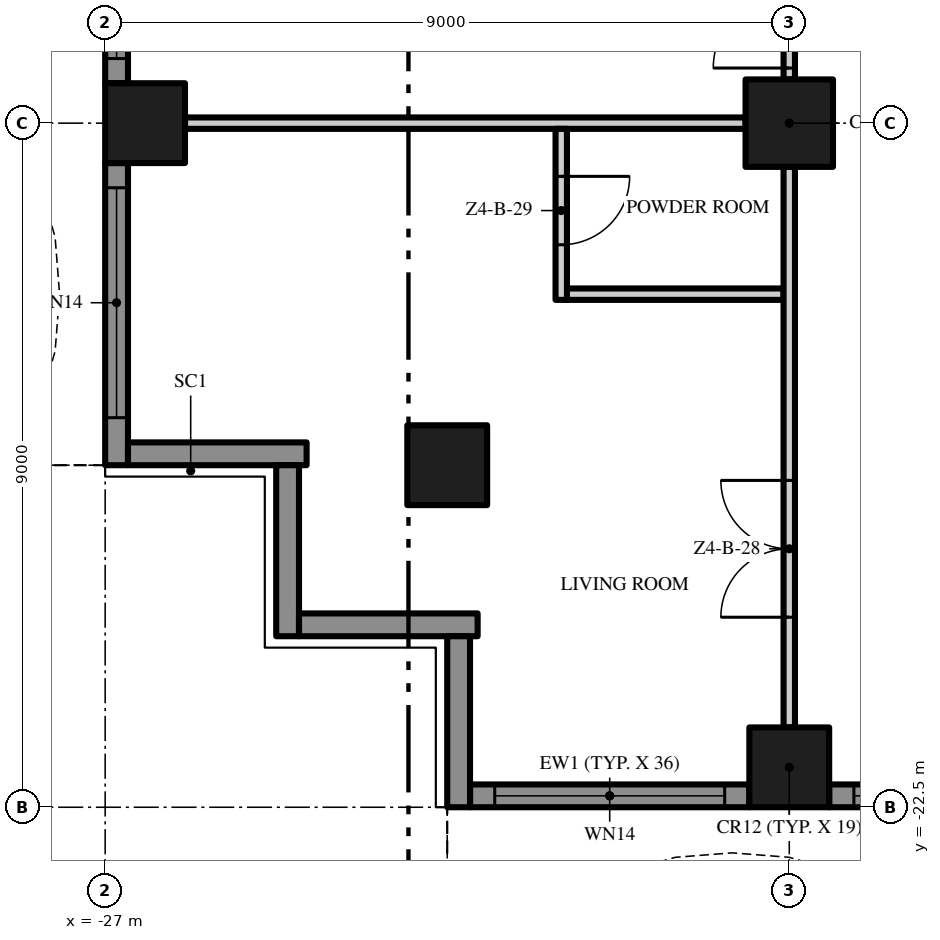
"""IFC4 building model, lengths in metres.
Left out: names, types, materials, properties, quantities, classifications, styles, units other than length and angle.
Written with IfcOpenShell. Run it as: python <this file> out.ifc"""

import sys

from ifc_helpers import new_model, si_unit, direction, frame, frame_2d, origin, origin_2d, place, context, subcontext, project, spatial, polyline, rectangle, outline, extrude, element, fill, save


model = new_model("IFC4")
c1 = context("Model", 3, precision=1e-05, world=origin(), true_north=direction((0.0, 1.0)))
c2 = subcontext(c1, "Body", "Model", "MODEL_VIEW")
j1 = project(units=[si_unit("LENGTHUNIT", "METRE"), si_unit("PLANEANGLEUNIT", "RADIAN")], contexts=[c1])
p1 = place(None, origin())
s1 = spatial("IfcSite", under=j1, at=p1, CompositionType="ELEMENT")
p2 = place(p1, origin())
s2 = spatial("IfcBuilding", under=s1, at=p2, CompositionType="ELEMENT")
p3 = place(p2, frame((0.0, 0.0, 195.8)))
s3 = spatial("IfcBuildingStorey", under=s2, at=p3, CompositionType="ELEMENT", Elevation=195.8)
p4 = place(p3, frame((-18.0, -13.5, 0.0), z_axis=(0.0, 0.0, 1.0), x_axis=(1.0, 0.0, 0.0)))
e1 = element("IfcColumn", 1, at=p4, inside=s3, PredefinedType="COLUMN", context=c2, shape_type="SweptSolid", body=[
    extrude(rectangle(XDim=1.15, YDim=1.15, at=origin_2d()), origin(), (0.0, 0.0, 1.0), 3.5),
])
for number, where, z_axis, x_axis in (
    (2, (-18.0, -21.975, 0.0), (0.0, 0.0, 1.0), (1.0, 0.0, 0.0)),
    (3, (-26.475, -13.5, 0.0), (0.0, 0.0, 1.0), (1.0, 0.0, 0.0)),
    (4, (-22.5, -18.0, 0.0), (0.0, 0.0, 1.0), (1.0, 0.0, 0.0)),
):
    element("IfcColumn", number, at=place(p3, frame(where, z_axis=z_axis, x_axis=x_axis)), inside=s3, PredefinedType="COLUMN", context=c2, shape_type="SweptSolid", body=[
        extrude(rectangle(XDim=1.05, YDim=1.05, at=origin_2d()), origin(), (0.0, 0.0, 1.0), 3.5),
    ])
p5 = place(p3, frame((-18.525, -22.35, 0.0), z_axis=(0.0, 0.0, 1.0), x_axis=(-1.0, 0.0, 0.0)))
e5 = element("IfcWall", 5, at=p5, inside=s3, PredefinedType="SOLIDWALL", context=c2, shape_type="SweptSolid", body=[
    extrude(rectangle(XDim=3.675, YDim=0.3, at=frame_2d((1.837, 0.0))), origin(), (0.0, 0.0, 1.0), 3.5),
])
p6 = place(p5, frame((0.325, 0.0, 0.45)))
e6 = element("IfcOpeningElement", 6, at=p6, cuts=e5, PredefinedType="OPENING", context=c2, shape_type="SweptSolid", body=[
    extrude(rectangle(XDim=3.025, YDim=2.65, at=frame_2d((1.512, 1.325))), frame((0.0, 0.16, 0.0), z_axis=(0.0, -1.0, 0.0), x_axis=(1.0, 0.0, 0.0)), (0.0, 0.0, 1.0), 0.32),
])
p7 = place(p3, frame((-9.525, -22.35, 0.0), z_axis=(0.0, 0.0, 1.0), x_axis=(-1.0, 0.0, 0.0)))
e7 = element("IfcWall", 7, at=p7, inside=s3, PredefinedType="SOLIDWALL", context=c2, shape_type="SweptSolid", body=[
    extrude(rectangle(XDim=7.95, YDim=0.3, at=frame_2d((3.975, 0.0))), origin(), (0.0, 0.0, 1.0), 3.5),
])
p8 = place(p7, frame((4.6, 0.0, 0.45)))
e8 = element("IfcOpeningElement", 8, at=p8, cuts=e7, PredefinedType="OPENING", context=c2, shape_type="SweptSolid", body=[
    extrude(rectangle(XDim=3.025, YDim=2.65, at=frame_2d((1.512, 1.325))), frame((0.0, 0.16, 0.0), z_axis=(0.0, -1.0, 0.0), x_axis=(1.0, 0.0, 0.0)), (0.0, 0.0, 1.0), 0.32),
])
p9 = place(p7, frame((0.325, 0.0, 0.0)))
e9 = element("IfcOpeningElement", 9, at=p9, cuts=e7, PredefinedType="OPENING", context=c2, shape_type="SweptSolid", body=[
    extrude(rectangle(XDim=3.025, YDim=2.4, at=frame_2d((1.512, 1.2))), frame((0.0, 0.16, 0.0), z_axis=(0.0, -1.0, 0.0), x_axis=(1.0, 0.0, 0.0)), (0.0, 0.0, 1.0), 0.32),
])
p10 = place(p3, frame((-26.85, -12.975, 0.0), z_axis=(0.0, 0.0, 1.0), x_axis=(0.0, 1.0, 0.0)))
e10 = element("IfcWall", 10, at=p10, inside=s3, PredefinedType="SOLIDWALL", context=c2, shape_type="SweptSolid", body=[
    extrude(rectangle(XDim=7.95, YDim=0.3, at=frame_2d((3.975, 0.0))), origin(), (0.0, 0.0, 1.0), 3.5),
])
p11 = place(p10, frame((4.6, 0.0, 0.0)))
e11 = element("IfcOpeningElement", 11, at=p11, cuts=e10, PredefinedType="OPENING", context=c2, shape_type="SweptSolid", body=[
    extrude(rectangle(XDim=3.025, YDim=2.4, at=frame_2d((1.512, 1.2))), frame((0.0, 0.16, 0.0), z_axis=(0.0, -1.0, 0.0), x_axis=(1.0, 0.0, 0.0)), (0.0, 0.0, 1.0), 0.32),
])
p12 = place(p10, frame((0.325, 0.0, 0.45)))
e12 = element("IfcOpeningElement", 12, at=p12, cuts=e10, PredefinedType="OPENING", context=c2, shape_type="SweptSolid", body=[
    extrude(rectangle(XDim=3.025, YDim=2.65, at=frame_2d((1.512, 1.325))), frame((0.0, 0.16, 0.0), z_axis=(0.0, -1.0, 0.0), x_axis=(1.0, 0.0, 0.0)), (0.0, 0.0, 1.0), 0.32),
])
p13 = place(p3, frame((-26.85, -18.0, 0.0), z_axis=(0.0, 0.0, 1.0), x_axis=(0.0, 1.0, 0.0)))
e13 = element("IfcWall", 13, at=p13, inside=s3, PredefinedType="SOLIDWALL", context=c2, shape_type="SweptSolid", body=[
    extrude(rectangle(XDim=3.975, YDim=0.3, at=frame_2d((1.988, 0.0))), origin(), (0.0, 0.0, 1.0), 3.5),
])
p14 = place(p13, frame((0.625, 0.0, 0.45)))
e14 = element("IfcOpeningElement", 14, at=p14, cuts=e13, PredefinedType="OPENING", context=c2, shape_type="SweptSolid", body=[
    extrude(rectangle(XDim=3.025, YDim=2.65, at=frame_2d((1.512, 1.325))), frame((0.0, 0.16, 0.0), z_axis=(0.0, -1.0, 0.0), x_axis=(1.0, 0.0, 0.0)), (0.0, 0.0, 1.0), 0.32),
])
p15 = place(p3, frame((-24.35, -17.85, 0.0), z_axis=(0.0, 0.0, 1.0), x_axis=(-1.0, 0.0, 0.0)))
e15 = element("IfcWall", 15, at=p15, inside=s3, PredefinedType="SOLIDWALL", context=c2, shape_type="SweptSolid", body=[
    extrude(rectangle(XDim=2.35, YDim=0.3, at=frame_2d((1.175, 0.0))), origin(), (0.0, 0.0, 1.0), 3.5),
])
p16 = place(p3, frame((-24.6, -20.25, 0.0), z_axis=(0.0, 0.0, 1.0), x_axis=(0.0, 1.0, 0.0)))
e16 = element("IfcWall", 16, at=p16, inside=s3, PredefinedType="SOLIDWALL", context=c2, shape_type="SweptSolid", body=[
    extrude(rectangle(XDim=2.25, YDim=0.3, at=frame_2d((1.125, 0.0))), origin(), (0.0, 0.0, 1.0), 3.5),
])
p17 = place(p3, frame((-22.1, -20.1, 0.0), z_axis=(0.0, 0.0, 1.0), x_axis=(-1.0, 0.0, 0.0)))
e17 = element("IfcWall", 17, at=p17, inside=s3, PredefinedType="SOLIDWALL", context=c2, shape_type="SweptSolid", body=[
    extrude(rectangle(XDim=2.35, YDim=0.3, at=frame_2d((1.175, 0.0))), origin(), (0.0, 0.0, 1.0), 3.5),
])
p18 = place(p3, frame((-22.35, -22.5, 0.0), z_axis=(0.0, 0.0, 1.0), x_axis=(0.0, 1.0, 0.0)))
e18 = element("IfcWall", 18, at=p18, inside=s3, PredefinedType="SOLIDWALL", context=c2, shape_type="SweptSolid", body=[
    extrude(rectangle(XDim=2.25, YDim=0.3, at=frame_2d((1.125, 0.0))), origin(), (0.0, 0.0, 1.0), 3.5),
])
p19 = place(p3, origin())
e19 = element("IfcWall", 19, at=p19, inside=s3, PredefinedType="USERDEFINED", context=c2, shape_type="SweptSolid", body=[
    extrude(outline(polyline([(-22.5, -24.3), (-21.0, -23.595), (-19.5, -23.159), (-18.75, -23.1), (-18.0, -23.159), (-16.5, -23.595), (-15.0, -24.3), (-13.5, -25.005), (-12.0, -25.441), (-11.25, -25.5), (-10.5, -25.441), (-9.0, -25.005), (-7.5, -24.3), (-6.0, -23.595), (-4.5, -23.159), (-3.75, -23.1), (-3.0, -23.159), (-1.5, -23.595), (0.0, -24.3), (1.5, -25.005), (3.0, -25.441), (3.75, -25.5), (4.5, -25.441), (6.0, -25.005), (7.5, -24.3), (9.0, -23.595), (10.5, -23.159), (11.25, -23.1), (12.0, -23.159), (13.5, -23.595), (15.0, -24.3), (16.5, -25.005), (18.0, -25.441), (18.75, -25.5), (19.5, -25.441), (21.0, -25.005), (22.5, -24.3), (22.394, -24.074), (20.911, -24.771), (19.455, -25.194), (18.75, -25.249), (18.045, -25.194), (16.589, -24.771), (15.106, -24.074), (13.589, -23.36), (12.045, -22.911), (11.25, -22.849), (10.455, -22.911), (8.911, -23.36), (7.394, -24.074), (5.911, -24.771), (4.455, -25.194), (3.75, -25.249), (3.045, -25.194), (1.589, -24.771), (0.106, -24.074), (-1.411, -23.36), (-2.955, -22.911), (-3.75, -22.849), (-4.545, -22.911), (-6.089, -23.36), (-7.606, -24.074), (-9.089, -24.771), (-10.545, -25.194), (-11.25, -25.249), (-11.955, -25.194), (-13.411, -24.771), (-14.894, -24.074), (-16.411, -23.36), (-17.955, -22.911), (-18.75, -22.849), (-19.545, -22.911), (-21.089, -23.36), (-22.606, -24.074), (-22.5, -24.3)])), origin(), (0.0, 0.0, 1.0), 0.9),
])
p20 = place(p3, origin())
e20 = element("IfcWall", 20, at=p20, inside=s3, PredefinedType="USERDEFINED", context=c2, shape_type="SweptSolid", body=[
    extrude(outline(polyline([(-28.8, 18.0), (-28.095, 16.5), (-27.659, 15.0), (-27.6, 14.25), (-27.659, 13.5), (-28.095, 12.0), (-28.8, 10.5), (-29.505, 9.0), (-29.941, 7.5), (-30.0, 6.75), (-29.941, 6.0), (-29.505, 4.5), (-28.8, 3.0), (-28.095, 1.5), (-27.659, 0.0), (-27.6, -0.75), (-27.659, -1.5), (-28.095, -3.0), (-28.8, -4.5), (-29.505, -6.0), (-29.941, -7.5), (-30.0, -8.25), (-29.941, -9.0), (-29.505, -10.5), (-28.8, -12.0), (-28.095, -13.5), (-27.659, -15.0), (-27.6, -15.75), (-27.659, -16.5), (-28.095, -18.0), (-27.855, -18.07), (-27.411, -16.545), (-27.349, -15.75), (-27.411, -14.955), (-27.86, -13.411), (-28.574, -11.894), (-29.271, -10.411), (-29.694, -8.955), (-29.749, -8.25), (-29.694, -7.545), (-29.271, -6.089), (-28.574, -4.606), (-27.86, -3.089), (-27.411, -1.545), (-27.349, -0.75), (-27.411, 0.045), (-27.86, 1.589), (-28.574, 3.106), (-29.271, 4.589), (-29.694, 6.045), (-29.749, 6.75), (-29.694, 7.455), (-29.271, 8.911), (-28.574, 10.394), (-27.86, 11.911), (-27.411, 13.455), (-27.349, 14.25), (-27.411, 15.045), (-27.86, 16.589), (-28.574, 18.106), (-28.8, 18.0)])), origin(), (0.0, 0.0, 1.0), 0.9),
])
p21 = place(p3, frame((-20.925, -15.75, 0.0), z_axis=(0.0, 0.0, 1.0), x_axis=(1.0, 0.0, 0.0)))
e21 = element("IfcWall", 21, at=p21, inside=s3, PredefinedType="PARTITIONING", context=c2, shape_type="SweptSolid", body=[
    extrude(rectangle(XDim=2.85, YDim=0.15, at=frame_2d((1.425, 0.0))), origin(), (0.0, 0.0, 1.0), 3.5),
])
p22 = place(p3, frame((-25.95, -13.5, 0.0), z_axis=(0.0, 0.0, 1.0), x_axis=(1.0, 0.0, 0.0)))
e22 = element("IfcWall", 22, at=p22, inside=s3, PredefinedType="PARTITIONING", context=c2, shape_type="SweptSolid", body=[
    extrude(rectangle(XDim=7.375, YDim=0.15, at=frame_2d((3.688, 0.0))), origin(), (0.0, 0.0, 1.0), 3.5),
])
p23 = place(p3, frame((-21.0, -13.575, 0.0), z_axis=(0.0, 0.0, 1.0), x_axis=(0.0, -1.0, 0.0)))
e23 = element("IfcWall", 23, at=p23, inside=s3, PredefinedType="PARTITIONING", context=c2, shape_type="SweptSolid", body=[
    extrude(rectangle(XDim=2.25, YDim=0.15, at=frame_2d((1.125, 0.0))), origin(), (0.0, 0.0, 1.0), 3.5),
])
p24 = place(p23, frame((0.625, 0.0, 0.0)))
e24 = element("IfcOpeningElement", 24, at=p24, cuts=e23, PredefinedType="OPENING", context=c2, shape_type="SweptSolid", body=[
    extrude(rectangle(XDim=0.9, YDim=2.1, at=frame_2d((0.45, 1.05))), frame((0.0, 0.085, 0.0), z_axis=(0.0, -1.0, 0.0), x_axis=(1.0, 0.0, 0.0)), (0.0, 0.0, 1.0), 0.17),
])
p25 = place(p3, frame((-18.0, -21.45, 0.0), z_axis=(0.0, 0.0, 1.0), x_axis=(0.0, 1.0, 0.0)))
e25 = element("IfcWall", 25, at=p25, inside=s3, PredefinedType="PARTITIONING", context=c2, shape_type="SweptSolid", body=[
    extrude(rectangle(XDim=7.375, YDim=0.15, at=frame_2d((3.688, 0.0))), origin(), (0.0, 0.0, 1.0), 3.5),
])
p26 = place(p25, frame((1.45, 0.0, 0.0)))
e26 = element("IfcOpeningElement", 26, at=p26, cuts=e25, PredefinedType="OPENING", context=c2, shape_type="SweptSolid", body=[
    extrude(rectangle(XDim=1.8, YDim=2.4, at=frame_2d((0.9, 1.2))), frame((0.0, 0.085, 0.0), z_axis=(0.0, -1.0, 0.0), x_axis=(1.0, 0.0, 0.0)), (0.0, 0.0, 1.0), 0.17),
])
p27 = place(p3, frame((-18.0, -12.925, 0.0), z_axis=(0.0, 0.0, 1.0), x_axis=(0.0, 1.0, 0.0)))
e27 = element("IfcWall", 27, at=p27, inside=s3, PredefinedType="PARTITIONING", context=c2, shape_type="SweptSolid", body=[
    extrude(rectangle(XDim=7.85, YDim=0.15, at=frame_2d((3.925, 0.0))), origin(), (0.0, 0.0, 1.0), 3.5),
])
p28 = place(p27, frame((6.7, 0.0, 0.0)))
e28 = element("IfcOpeningElement", 28, at=p28, cuts=e27, PredefinedType="OPENING", context=c2, shape_type="SweptSolid", body=[
    extrude(rectangle(XDim=1.0, YDim=2.4, at=frame_2d((0.5, 1.2))), frame((0.0, 0.085, 0.0), z_axis=(0.0, -1.0, 0.0), x_axis=(1.0, 0.0, 0.0)), (0.0, 0.0, 1.0), 0.17),
])
p29 = place(p27, frame((0.15, 0.0, 0.0)))
e29 = element("IfcOpeningElement", 29, at=p29, cuts=e27, PredefinedType="OPENING", context=c2, shape_type="SweptSolid", body=[
    extrude(rectangle(XDim=1.0, YDim=2.4, at=frame_2d((0.5, 1.2))), frame((0.0, 0.085, 0.0), z_axis=(0.0, -1.0, 0.0), x_axis=(1.0, 0.0, 0.0)), (0.0, 0.0, 1.0), 0.17),
])
p30 = place(p6, origin())
e30 = element("IfcWindow", 30, at=p30, inside=s3, PartitioningType="SINGLE_PANEL", PredefinedType="WINDOW", context=c2, shape_type="SweptSolid", body=[
    extrude(rectangle(XDim=3.025, YDim=2.65, at=frame_2d((1.512, 1.325))), frame((0.0, 0.03, 0.0), z_axis=(0.0, -1.0, 0.0), x_axis=(1.0, 0.0, 0.0)), (0.0, 0.0, 1.0), 0.06),
])
fill(e6, e30)
p31 = place(p8, origin())
e31 = element("IfcWindow", 31, at=p31, inside=s3, PartitioningType="SINGLE_PANEL", PredefinedType="WINDOW", context=c2, shape_type="SweptSolid", body=[
    extrude(rectangle(XDim=3.025, YDim=2.65, at=frame_2d((1.512, 1.325))), frame((0.0, 0.03, 0.0), z_axis=(0.0, -1.0, 0.0), x_axis=(1.0, 0.0, 0.0)), (0.0, 0.0, 1.0), 0.06),
])
fill(e8, e31)
p32 = place(p12, origin())
e32 = element("IfcWindow", 32, at=p32, inside=s3, PartitioningType="SINGLE_PANEL", PredefinedType="WINDOW", context=c2, shape_type="SweptSolid", body=[
    extrude(rectangle(XDim=3.025, YDim=2.65, at=frame_2d((1.512, 1.325))), frame((0.0, 0.03, 0.0), z_axis=(0.0, -1.0, 0.0), x_axis=(1.0, 0.0, 0.0)), (0.0, 0.0, 1.0), 0.06),
])
fill(e12, e32)
p33 = place(p14, origin())
e33 = element("IfcWindow", 33, at=p33, inside=s3, PartitioningType="SINGLE_PANEL", PredefinedType="WINDOW", context=c2, shape_type="SweptSolid", body=[
    extrude(rectangle(XDim=3.025, YDim=2.65, at=frame_2d((1.512, 1.325))), frame((0.0, 0.03, 0.0), z_axis=(0.0, -1.0, 0.0), x_axis=(1.0, 0.0, 0.0)), (0.0, 0.0, 1.0), 0.06),
])
fill(e14, e33)
p34 = place(p29, origin())
e34 = element("IfcDoor", 34, at=p34, inside=s3, OperationType="SINGLE_SWING_LEFT", PredefinedType="DOOR", context=c2, shape_type="SweptSolid", body=[
    extrude(rectangle(XDim=1.0, YDim=2.4, at=frame_2d((0.5, 1.2))), frame((0.0, 0.025, 0.0), z_axis=(0.0, -1.0, 0.0), x_axis=(1.0, 0.0, 0.0)), (0.0, 0.0, 1.0), 0.05),
])
fill(e29, e34)
p35 = place(p26, origin())
e35 = element("IfcDoor", 35, at=p35, inside=s3, OperationType="DOUBLE_DOOR_SINGLE_SWING", PredefinedType="DOOR", context=c2, shape_type="SweptSolid", body=[
    extrude(rectangle(XDim=1.8, YDim=2.4, at=frame_2d((0.9, 1.2))), frame((0.0, 0.025, 0.0), z_axis=(0.0, -1.0, 0.0), x_axis=(1.0, 0.0, 0.0)), (0.0, 0.0, 1.0), 0.05),
])
fill(e26, e35)
p36 = place(p24, origin())
e36 = element("IfcDoor", 36, at=p36, inside=s3, OperationType="SINGLE_SWING_LEFT", PredefinedType="DOOR", context=c2, shape_type="SweptSolid", body=[
    extrude(rectangle(XDim=0.9, YDim=2.1, at=frame_2d((0.45, 1.05))), frame((0.0, 0.025, 0.0), z_axis=(0.0, -1.0, 0.0), x_axis=(1.0, 0.0, 0.0)), (0.0, 0.0, 1.0), 0.05),
])
fill(e24, e36)
save(model, sys.argv[1])
